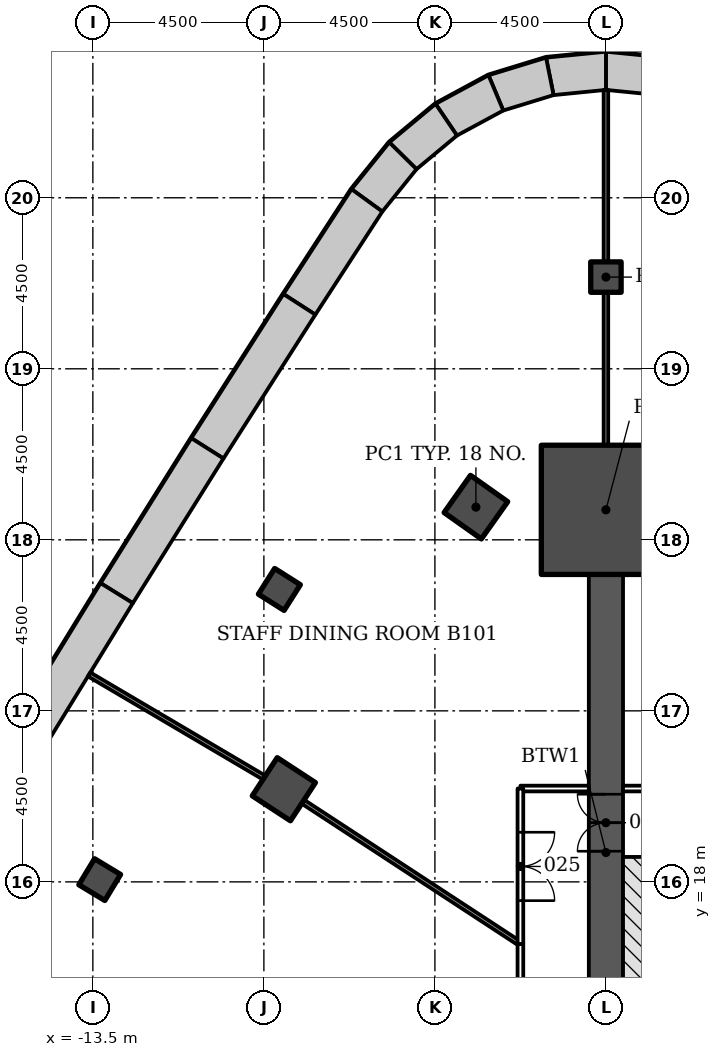
"""IFC4 building model, lengths in metres.
Left out: names, types, materials, properties, quantities, classifications, styles, units other than length and angle.
Written with IfcOpenShell. Run it as: python <this file> out.ifc"""

import sys

from ifc_helpers import new_model, si_unit, direction, frame, frame_2d, origin, origin_2d, place, context, subcontext, project, spatial, polyline, rectangle, outline, extrude, element, fill, save


model = new_model("IFC4")
c1 = context("Model", 3, precision=1e-05, world=origin(), true_north=direction((0.0, 1.0)))
c2 = subcontext(c1, "Body", "Model", "MODEL_VIEW")
j1 = project(units=[si_unit("LENGTHUNIT", "METRE"), si_unit("PLANEANGLEUNIT", "RADIAN")], contexts=[c1])
p1 = place(None, origin())
s1 = spatial("IfcSite", under=j1, at=p1, CompositionType="ELEMENT")
p2 = place(p1, origin())
s2 = spatial("IfcBuilding", under=s1, at=p2, CompositionType="ELEMENT")
p3 = place(p2, frame((0.0, 0.0, -4.5)))
s3 = spatial("IfcBuildingStorey", under=s2, at=p3, CompositionType="ELEMENT", Elevation=-4.5)
p4 = place(p3, origin())
e1 = element("IfcWall", 1, at=p4, inside=s3, PredefinedType="SOLIDWALL", context=c2, shape_type="SweptSolid", body=[
    extrude(outline(polyline([(1.576, 39.687), (0.0, 39.844), (0.0, 38.839), (1.378, 38.702), (1.576, 39.687)])), origin(), (0.0, 0.0, 1.0), 4.25),
])
p5 = place(p3, origin())
e2 = element("IfcWall", 2, at=p5, inside=s3, PredefinedType="SOLIDWALL", context=c2, shape_type="SweptSolid", body=[
    extrude(outline(polyline([(0.0, 39.844), (-1.576, 39.687), (-1.378, 38.702), (0.0, 38.839), (0.0, 39.844)])), origin(), (0.0, 0.0, 1.0), 4.25),
])
p6 = place(p3, origin())
e3 = element("IfcWall", 3, at=p6, inside=s3, PredefinedType="SOLIDWALL", context=c2, shape_type="SweptSolid", body=[
    extrude(outline(polyline([(-1.576, 39.687), (-3.089, 39.223), (-2.701, 38.296), (-1.378, 38.702), (-1.576, 39.687)])), origin(), (0.0, 0.0, 1.0), 4.25),
])
p7 = place(p3, origin())
e4 = element("IfcWall", 4, at=p7, inside=s3, PredefinedType="SOLIDWALL", context=c2, shape_type="SweptSolid", body=[
    extrude(outline(polyline([(-3.089, 39.223), (-4.482, 38.47), (-3.919, 37.638), (-2.701, 38.296), (-3.089, 39.223)])), origin(), (0.0, 0.0, 1.0), 4.25),
])
p8 = place(p3, origin())
e5 = element("IfcWall", 5, at=p8, inside=s3, PredefinedType="SOLIDWALL", context=c2, shape_type="SweptSolid", body=[
    extrude(outline(polyline([(-4.482, 38.47), (-5.699, 37.458), (-4.984, 36.752), (-3.919, 37.638), (-4.482, 38.47)])), origin(), (0.0, 0.0, 1.0), 4.25),
])
p9 = place(p3, origin())
e6 = element("IfcWall", 6, at=p9, inside=s3, PredefinedType="SOLIDWALL", context=c2, shape_type="SweptSolid", body=[
    extrude(outline(polyline([(-5.699, 37.458), (-6.694, 36.225), (-5.883, 35.637), (-4.984, 36.752), (-5.699, 37.458)])), origin(), (0.0, 0.0, 1.0), 4.25),
])
p10 = place(p3, origin())
e7 = element("IfcWall", 7, at=p10, inside=s3, PredefinedType="SOLIDWALL", context=c2, shape_type="SweptSolid", body=[
    extrude(outline(polyline([(-6.694, 36.225), (-8.486, 33.467), (-7.646, 32.925), (-5.883, 35.637), (-6.694, 36.225)])), origin(), (0.0, 0.0, 1.0), 4.25),
])
p11 = place(p3, origin())
e8 = element("IfcWall", 8, at=p11, inside=s3, PredefinedType="SOLIDWALL", context=c2, shape_type="SweptSolid", body=[
    extrude(outline(polyline([(-8.486, 33.467), (-10.909, 29.675), (-10.064, 29.14), (-7.646, 32.925), (-8.486, 33.467)])), origin(), (0.0, 0.0, 1.0), 4.25),
])
p12 = place(p3, origin())
e9 = element("IfcWall", 9, at=p12, inside=s3, PredefinedType="SOLIDWALL", context=c2, shape_type="SweptSolid", body=[
    extrude(outline(polyline([(-10.909, 29.675), (-13.297, 25.861), (-12.448, 25.334), (-10.064, 29.14), (-10.909, 29.675)])), origin(), (0.0, 0.0, 1.0), 4.25),
])
p13 = place(p3, origin())
e10 = element("IfcWall", 10, at=p13, inside=s3, PredefinedType="SOLIDWALL", context=c2, shape_type="SweptSolid", body=[
    extrude(outline(polyline([(-13.297, 25.861), (-15.652, 22.026), (-14.797, 21.506), (-12.448, 25.334), (-13.297, 25.861)])), origin(), (0.0, 0.0, 1.0), 4.25),
])
for number, where, z_axis, x_axis in (
    (11, (-3.421, 27.86, -0.3), (0.0, 0.0, 1.0), (-0.816, 0.578, 0.0)),
    (12, (-8.475, 20.438, -0.3), (0.0, 0.0, 1.0), (-0.837, 0.547, 0.0)),
):
    element("IfcColumn", number, at=place(p3, frame(where, z_axis=z_axis, x_axis=x_axis)), inside=s3, PredefinedType="COLUMN", context=c2, shape_type="SweptSolid", body=[
        extrude(rectangle(XDim=1.2, YDim=1.2, at=origin_2d()), origin(), (0.0, 0.0, 1.0), 4.55),
    ])
for number, where, z_axis, x_axis in (
    (13, (0.0, 33.913, -0.3), (0.0, 0.0, 1.0), (0.0, 1.0, 0.0)),
    (14, (-8.592, 25.695, -0.3), (0.0, 0.0, 1.0), (-0.845, 0.535, 0.0)),
    (15, (-13.32, 18.059, -0.3), (0.0, 0.0, 1.0), (-0.856, 0.518, 0.0)),
):
    element("IfcColumn", number, at=place(p3, frame(where, z_axis=z_axis, x_axis=x_axis)), inside=s3, PredefinedType="COLUMN", context=c2, shape_type="SweptSolid", body=[
        extrude(rectangle(XDim=0.8, YDim=0.8, at=origin_2d()), origin(), (0.0, 0.0, 1.0), 4.55),
    ])
p14 = place(p3, frame((0.0, 11.456, -0.3), z_axis=(0.0, 0.0, 1.0), x_axis=(0.0, 1.0, 0.0)))
e16 = element("IfcWall", 16, at=p14, inside=s3, PredefinedType="SHEAR", context=c2, shape_type="SweptSolid", body=[
    extrude(rectangle(XDim=14.633, YDim=0.9, at=frame_2d((7.316, 0.0))), origin(), (0.0, 0.0, 1.0), 4.55),
])
p15 = place(p14, frame((7.35, 0.0, 0.3)))
e17 = element("IfcOpeningElement", 17, at=p15, cuts=e16, PredefinedType="OPENING", context=c2, shape_type="SweptSolid", body=[
    extrude(rectangle(XDim=1.5, YDim=2.1, at=frame_2d((0.75, 1.05))), frame((0.0, 0.46, 0.0), z_axis=(0.0, -1.0, 0.0), x_axis=(1.0, 0.0, 0.0)), (0.0, 0.0, 1.0), 0.92),
])
p16 = place(p3, frame((0.0, 27.789, -0.3), z_axis=(0.0, 0.0, 1.0), x_axis=(0.0, 1.0, 0.0)))
e18 = element("IfcColumn", 18, at=p16, inside=s3, PredefinedType="COLUMN", context=c2, shape_type="SweptSolid", body=[
    extrude(rectangle(XDim=3.4, YDim=3.4, at=origin_2d()), origin(), (0.0, 0.0, 1.0), 4.55),
])
p17 = place(p3, frame((1.018, 11.456, -0.3), z_axis=(0.0, 0.0, 1.0), x_axis=(0.0, 1.0, 0.0)))
e19 = element("IfcWall", 19, at=p17, inside=s3, PredefinedType="SHEAR", context=c2, shape_type="SweptSolid", body=[
    extrude(rectangle(XDim=7.2, YDim=1.136, at=frame_2d((3.6, 0.0))), origin(), (0.0, 0.0, 1.0), 4.55),
])
p18 = place(p3, frame((7.136, 20.456, 0.0), z_axis=(0.0, 0.0, 1.0), x_axis=(-1.0, 0.0, 0.0)))
e20 = element("IfcWall", 20, at=p18, inside=s3, PredefinedType="PARTITIONING", context=c2, shape_type="SweptSolid", body=[
    extrude(rectangle(XDim=6.686, YDim=0.15, at=frame_2d((3.343, 0.0))), origin(), (0.0, 0.0, 1.0), 3.638),
])
p19 = place(p18, frame((2.45, 0.0, 0.0)))
e21 = element("IfcOpeningElement", 21, at=p19, cuts=e20, PredefinedType="OPENING", context=c2, shape_type="SweptSolid", body=[
    extrude(rectangle(XDim=1.8, YDim=2.1, at=frame_2d((0.9, 1.05))), frame((0.0, 0.085, 0.0), z_axis=(0.0, -1.0, 0.0), x_axis=(1.0, 0.0, 0.0)), (0.0, 0.0, 1.0), 0.17),
])
p20 = place(p3, frame((-13.769, 13.135, 0.0), z_axis=(0.0, 0.0, 1.0), x_axis=(-0.864615819332, 0.502433562734, 0.0)))
e22 = element("IfcWall", 22, at=p20, inside=s3, PredefinedType="PARTITIONING", context=c2, shape_type="SweptSolid", body=[
    extrude(rectangle(XDim=5.177, YDim=0.12, at=frame_2d((2.588, 0.0))), origin(), (0.0, 0.0, 1.0), 3.633),
])
p21 = place(p3, frame((-2.25, 16.367, 0.0), z_axis=(0.0, 0.0, 1.0), x_axis=(0.0, -1.0, 0.0)))
e23 = element("IfcWall", 23, at=p21, inside=s3, PredefinedType="PARTITIONING", context=c2, shape_type="SweptSolid", body=[
    extrude(rectangle(XDim=1.411, YDim=0.15, at=frame_2d((0.706, 0.0))), origin(), (0.0, 0.0, 1.0), 3.638),
])
p22 = place(p3, frame((-0.45, 20.456, 0.0), z_axis=(0.0, 0.0, 1.0), x_axis=(-1.0, 0.0, 0.0)))
e24 = element("IfcWall", 24, at=p22, inside=s3, PredefinedType="PARTITIONING", context=c2, shape_type="SweptSolid", body=[
    extrude(rectangle(XDim=1.8, YDim=0.15, at=frame_2d((0.9, 0.0))), origin(), (0.0, 0.0, 1.0), 3.638),
])
p23 = place(p3, frame((-2.25, 20.456, 0.0), z_axis=(0.0, 0.0, 1.0), x_axis=(0.0, -1.0, 0.0)))
e25 = element("IfcWall", 25, at=p23, inside=s3, PredefinedType="PARTITIONING", context=c2, shape_type="SweptSolid", body=[
    extrude(rectangle(XDim=4.089, YDim=0.15, at=frame_2d((2.044, 0.0))), origin(), (0.0, 0.0, 1.0), 3.638),
])
p24 = place(p23, frame((1.15, 0.0, 0.0)))
e26 = element("IfcOpeningElement", 26, at=p24, cuts=e25, PredefinedType="OPENING", context=c2, shape_type="SweptSolid", body=[
    extrude(rectangle(XDim=1.8, YDim=2.1, at=frame_2d((0.9, 1.05))), frame((0.0, 0.085, 0.0), z_axis=(0.0, -1.0, 0.0), x_axis=(1.0, 0.0, 0.0)), (0.0, 0.0, 1.0), 0.17),
])
p25 = place(p3, frame((-8.992, 20.743, 0.0), z_axis=(0.0, 0.0, 1.0), x_axis=(-0.861446814084, 0.507847798563, 0.0)))
e27 = element("IfcWall", 27, at=p25, inside=s3, PredefinedType="PARTITIONING", context=c2, shape_type="SweptSolid", body=[
    extrude(rectangle(XDim=5.348, YDim=0.12, at=frame_2d((2.674, 0.0))), origin(), (0.0, 0.0, 1.0), 3.633),
])
p26 = place(p3, frame((-2.252, 16.367, 0.0), z_axis=(0.0, 0.0, 1.0), x_axis=(-0.83688089218, 0.547385031129, 0.0)))
e28 = element("IfcWall", 28, at=p26, inside=s3, PredefinedType="PARTITIONING", context=c2, shape_type="SweptSolid", body=[
    extrude(rectangle(XDim=6.836, YDim=0.12, at=frame_2d((3.418, 0.0))), origin(), (0.0, 0.0, 1.0), 3.638),
])
p27 = place(p3, frame((0.0, 29.489, 0.0), z_axis=(0.0, 0.0, 1.0), x_axis=(0.0, 1.0, 0.0)))
e29 = element("IfcWall", 29, at=p27, inside=s3, PredefinedType="PARTITIONING", context=c2, shape_type="SweptSolid", body=[
    extrude(rectangle(XDim=4.024, YDim=0.12, at=frame_2d((2.012, 0.0))), origin(), (0.0, 0.0, 1.0), 3.717),
])
p28 = place(p3, frame((0.0, 34.313, 0.0), z_axis=(0.0, 0.0, 1.0), x_axis=(0.0, 1.0, 0.0)))
e30 = element("IfcWall", 30, at=p28, inside=s3, PredefinedType="PARTITIONING", context=c2, shape_type="SweptSolid", body=[
    extrude(rectangle(XDim=4.526, YDim=0.12, at=frame_2d((2.263, 0.0))), origin(), (0.0, 0.0, 1.0), 4.25),
])
p29 = place(p24, origin())
e31 = element("IfcDoor", 31, at=p29, inside=s3, OperationType="DOUBLE_DOOR_SINGLE_SWING", PredefinedType="DOOR", context=c2, shape_type="SweptSolid", body=[
    extrude(rectangle(XDim=1.8, YDim=2.1, at=frame_2d((0.9, 1.05))), frame((0.0, 0.025, 0.0), z_axis=(0.0, -1.0, 0.0), x_axis=(1.0, 0.0, 0.0)), (0.0, 0.0, 1.0), 0.05),
])
fill(e26, e31)
p30 = place(p15, origin())
e32 = element("IfcDoor", 32, at=p30, inside=s3, OperationType="DOUBLE_DOOR_SINGLE_SWING", PredefinedType="DOOR", context=c2, shape_type="SweptSolid", body=[
    extrude(rectangle(XDim=1.5, YDim=2.1, at=frame_2d((0.75, 1.05))), frame((0.0, 0.025, 0.0), z_axis=(0.0, -1.0, 0.0), x_axis=(1.0, 0.0, 0.0)), (0.0, 0.0, 1.0), 0.05),
])
fill(e17, e32)
save(model, sys.argv[1])
